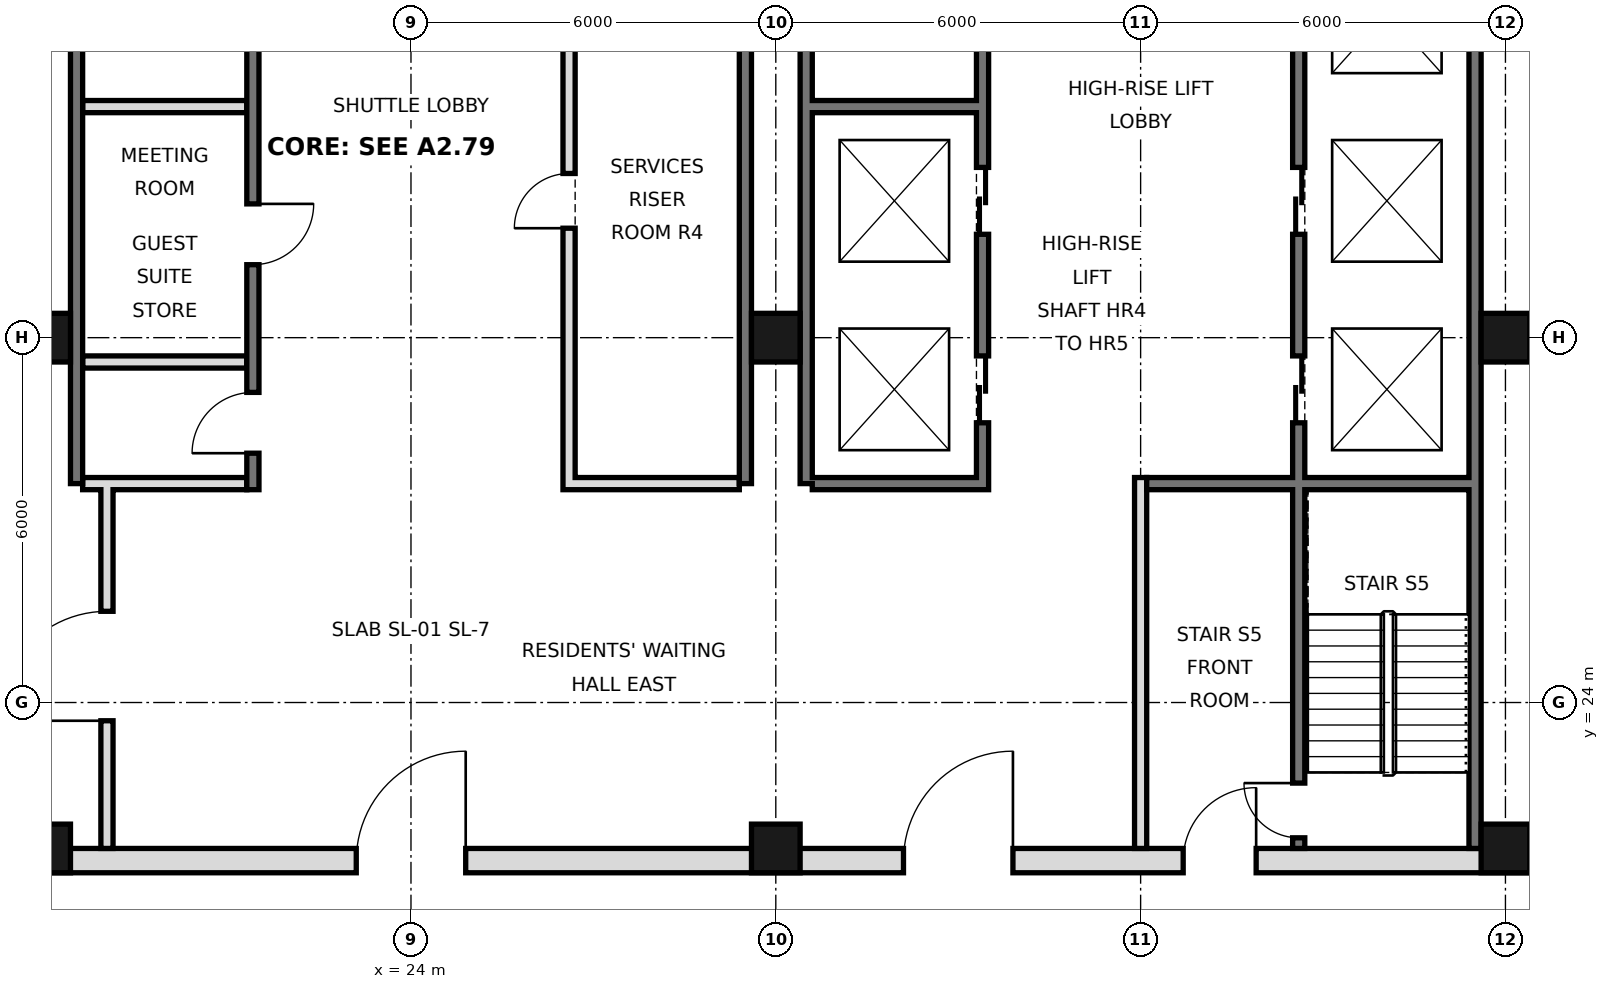
"""IFC4 building model, lengths in metres.
Left out: names, types, materials, properties, quantities, classifications, styles, units other than length and angle.
Written with IfcOpenShell. Run it as: python <this file> out.ifc"""

import sys

from ifc_helpers import new_model, si_unit, direction, frame, frame_2d, origin, origin_2d, place, context, subcontext, project, spatial, rectangle, hollow_rectangle, extrude, element, fill, save


model = new_model("IFC4")
c1 = context("Model", 3, precision=1e-05, world=origin(), true_north=direction((0.0, 1.0)))
c2 = subcontext(c1, "Body", "Model", "MODEL_VIEW")
j1 = project(units=[si_unit("LENGTHUNIT", "METRE"), si_unit("PLANEANGLEUNIT", "RADIAN")], contexts=[c1])
p1 = place(None, origin())
s1 = spatial("IfcSite", under=j1, at=p1, CompositionType="ELEMENT")
p2 = place(p1, origin())
s2 = spatial("IfcBuilding", under=s1, at=p2, CompositionType="ELEMENT")
p3 = place(p2, frame((0.0, 0.0, 316.0)))
s3 = spatial("IfcBuildingStorey", under=s2, at=p3, CompositionType="ELEMENT", Elevation=316.0)
for number, where, z_axis, x_axis in (
    (1, (18.0, 21.6, 0.0), (0.0, 0.0, 1.0), (1.0, 0.0, 0.0)),
    (2, (18.0, 30.0, 0.0), (0.0, 0.0, 1.0), (1.0, 0.0, 0.0)),
    (3, (30.0, 21.6, 0.0), (0.0, 0.0, 1.0), (1.0, 0.0, 0.0)),
    (4, (30.0, 30.0, 0.0), (0.0, 0.0, 1.0), (1.0, 0.0, 0.0)),
    (5, (42.0, 21.6, 0.0), (0.0, 0.0, 1.0), (1.0, 0.0, 0.0)),
    (6, (42.0, 30.0, 0.0), (0.0, 0.0, 1.0), (1.0, 0.0, 0.0)),
):
    element("IfcColumn", number, at=place(p3, frame(where, z_axis=z_axis, x_axis=x_axis)), inside=s3, PredefinedType="COLUMN", context=c2, shape_type="SweptSolid", body=[
        extrude(hollow_rectangle(XDim=0.8, YDim=0.8, WallThickness=0.025, at=origin_2d()), origin(), (0.0, 0.0, 1.0), 3.6),
    ])
p4 = place(p3, frame((41.5, 21.6, 0.0), z_axis=(0.0, 0.0, 1.0), x_axis=(0.0, 1.0, 0.0)))
e7 = element("IfcWall", 7, at=p4, inside=s3, PredefinedType="SOLIDWALL", context=c2, shape_type="SweptSolid", body=[
    extrude(rectangle(XDim=23.5, YDim=0.2, at=frame_2d((11.75, 0.0))), origin(), (0.0, 0.0, 1.0), 3.42),
])
for number, where, z_axis, x_axis in (
    (8, (18.5, 27.6, 0.0), (0.0, 0.0, 1.0), (0.0, 1.0, 0.0)),
    (9, (29.5, 27.6, 0.0), (0.0, 0.0, 1.0), (0.0, 1.0, 0.0)),
    (10, (30.5, 27.6, 0.0), (0.0, 0.0, 1.0), (0.0, 1.0, 0.0)),
):
    element("IfcWall", number, at=place(p3, frame(where, z_axis=z_axis, x_axis=x_axis)), inside=s3, PredefinedType="SOLIDWALL", context=c2, shape_type="SweptSolid", body=[
        extrude(rectangle(XDim=17.5, YDim=0.2, at=frame_2d((8.75, 0.0))), origin(), (0.0, 0.0, 1.0), 3.42),
    ])
p5 = place(p3, frame((5.6, 21.4, 0.0), z_axis=(0.0, 0.0, 1.0), x_axis=(1.0, 0.0, 0.0)))
e11 = element("IfcWall", 11, at=p5, inside=s3, PredefinedType="SOLIDWALL", context=c2, shape_type="SweptSolid", body=[
    extrude(rectangle(XDim=36.8, YDim=0.4, at=frame_2d((18.4, 0.0))), origin(), (0.0, 0.0, 1.0), 3.42),
])
p6 = place(p5, frame((8.5, 0.0, 0.0)))
e12 = element("IfcOpeningElement", 12, at=p6, cuts=e11, PredefinedType="OPENING", context=c2, shape_type="SweptSolid", body=[
    extrude(rectangle(XDim=1.8, YDim=2.1, at=frame_2d((0.9, 1.05))), frame((0.0, 0.21, 0.0), z_axis=(0.0, -1.0, 0.0), x_axis=(1.0, 0.0, 0.0)), (0.0, 0.0, 1.0), 0.42),
])
p7 = place(p5, frame((17.5, 0.0, 0.0)))
e13 = element("IfcOpeningElement", 13, at=p7, cuts=e11, PredefinedType="OPENING", context=c2, shape_type="SweptSolid", body=[
    extrude(rectangle(XDim=1.8, YDim=2.1, at=frame_2d((0.9, 1.05))), frame((0.0, 0.21, 0.0), z_axis=(0.0, -1.0, 0.0), x_axis=(1.0, 0.0, 0.0)), (0.0, 0.0, 1.0), 0.42),
])
p8 = place(p5, frame((26.5, 0.0, 0.0)))
e14 = element("IfcOpeningElement", 14, at=p8, cuts=e11, PredefinedType="OPENING", context=c2, shape_type="SweptSolid", body=[
    extrude(rectangle(XDim=1.8, YDim=2.1, at=frame_2d((0.9, 1.05))), frame((0.0, 0.21, 0.0), z_axis=(0.0, -1.0, 0.0), x_axis=(1.0, 0.0, 0.0)), (0.0, 0.0, 1.0), 0.42),
])
p9 = place(p5, frame((4.5, 0.0, 0.0)))
e15 = element("IfcOpeningElement", 15, at=p9, cuts=e11, PredefinedType="OPENING", context=c2, shape_type="SweptSolid", body=[
    extrude(rectangle(XDim=1.2, YDim=2.1, at=frame_2d((0.6, 1.05))), frame((0.0, 0.21, 0.0), z_axis=(0.0, -1.0, 0.0), x_axis=(1.0, 0.0, 0.0)), (0.0, 0.0, 1.0), 0.42),
])
p10 = place(p5, frame((31.1, 0.0, 0.0)))
e16 = element("IfcOpeningElement", 16, at=p10, cuts=e11, PredefinedType="OPENING", context=c2, shape_type="SweptSolid", body=[
    extrude(rectangle(XDim=1.2, YDim=2.1, at=frame_2d((0.6, 1.05))), frame((0.0, 0.21, 0.0), z_axis=(0.0, -1.0, 0.0), x_axis=(1.0, 0.0, 0.0)), (0.0, 0.0, 1.0), 0.42),
])
p11 = place(p3, frame((19.0, 21.6, 0.0), z_axis=(0.0, 0.0, 1.0), x_axis=(0.0, 1.0, 0.0)))
e17 = element("IfcWall", 17, at=p11, inside=s3, PredefinedType="PARTITIONING", context=c2, shape_type="SweptSolid", body=[
    extrude(rectangle(XDim=6.0, YDim=0.2, at=frame_2d((3.0, 0.0))), origin(), (0.0, 0.0, 1.0), 3.42),
])
p12 = place(p11, frame((2.1, 0.0, 0.0)))
e18 = element("IfcOpeningElement", 18, at=p12, cuts=e17, PredefinedType="OPENING", context=c2, shape_type="SweptSolid", body=[
    extrude(rectangle(XDim=1.8, YDim=2.1, at=frame_2d((0.9, 1.05))), frame((0.0, 0.11, 0.0), z_axis=(0.0, -1.0, 0.0), x_axis=(1.0, 0.0, 0.0)), (0.0, 0.0, 1.0), 0.22),
])
p13 = place(p3, frame((21.4, 27.5, 0.0), z_axis=(0.0, 0.0, 1.0), x_axis=(0.0, 1.0, 0.0)))
e19 = element("IfcWall", 19, at=p13, inside=s3, PredefinedType="SOLIDWALL", context=c2, shape_type="SweptSolid", body=[
    extrude(rectangle(XDim=17.5, YDim=0.2, at=frame_2d((8.75, 0.0))), origin(), (0.0, 0.0, 1.0), 3.42),
])
p14 = place(p13, frame((0.6, 0.0, 0.0)))
e20 = element("IfcOpeningElement", 20, at=p14, cuts=e19, PredefinedType="OPENING", context=c2, shape_type="SweptSolid", body=[
    extrude(rectangle(XDim=1.0, YDim=2.1, at=frame_2d((0.5, 1.05))), frame((0.0, 0.11, 0.0), z_axis=(0.0, -1.0, 0.0), x_axis=(1.0, 0.0, 0.0)), (0.0, 0.0, 1.0), 0.22),
])
p15 = place(p13, frame((3.7, 0.0, 0.0)))
e21 = element("IfcOpeningElement", 21, at=p15, cuts=e19, PredefinedType="OPENING", context=c2, shape_type="SweptSolid", body=[
    extrude(rectangle(XDim=1.0, YDim=2.1, at=frame_2d((0.5, 1.05))), frame((0.0, 0.11, 0.0), z_axis=(0.0, -1.0, 0.0), x_axis=(1.0, 0.0, 0.0)), (0.0, 0.0, 1.0), 0.22),
])
p16 = place(p13, frame((16.2, 0.0, 0.0)))
e22 = element("IfcOpeningElement", 22, at=p16, cuts=e19, PredefinedType="OPENING", context=c2, shape_type="SweptSolid", body=[
    extrude(rectangle(XDim=1.0, YDim=2.1, at=frame_2d((0.5, 1.05))), frame((0.0, 0.11, 0.0), z_axis=(0.0, -1.0, 0.0), x_axis=(1.0, 0.0, 0.0)), (0.0, 0.0, 1.0), 0.22),
])
p17 = place(p13, frame((7.4, 0.0, 0.0)))
e23 = element("IfcOpeningElement", 23, at=p17, cuts=e19, PredefinedType="OPENING", context=c2, shape_type="SweptSolid", body=[
    extrude(rectangle(XDim=0.9, YDim=2.1, at=frame_2d((0.45, 1.05))), frame((0.0, 0.11, 0.0), z_axis=(0.0, -1.0, 0.0), x_axis=(1.0, 0.0, 0.0)), (0.0, 0.0, 1.0), 0.22),
])
p18 = place(p3, frame((26.6, 27.5, 0.0), z_axis=(0.0, 0.0, 1.0), x_axis=(0.0, 1.0, 0.0)))
e24 = element("IfcWall", 24, at=p18, inside=s3, PredefinedType="SOLIDWALL", context=c2, shape_type="SweptSolid", body=[
    extrude(rectangle(XDim=17.5, YDim=0.2, at=frame_2d((8.75, 0.0))), origin(), (0.0, 0.0, 1.0), 3.42),
])
p19 = place(p18, frame((4.3, 0.0, 0.0)))
e25 = element("IfcOpeningElement", 25, at=p19, cuts=e24, PredefinedType="OPENING", context=c2, shape_type="SweptSolid", body=[
    extrude(rectangle(XDim=0.9, YDim=2.1, at=frame_2d((0.45, 1.05))), frame((0.0, 0.11, 0.0), z_axis=(0.0, -1.0, 0.0), x_axis=(1.0, 0.0, 0.0)), (0.0, 0.0, 1.0), 0.22),
])
p20 = place(p18, frame((10.35, 0.0, 0.0)))
e26 = element("IfcOpeningElement", 26, at=p20, cuts=e24, PredefinedType="OPENING", context=c2, shape_type="SweptSolid", body=[
    extrude(rectangle(XDim=1.0, YDim=2.1, at=frame_2d((0.5, 1.05))), frame((0.0, 0.11, 0.0), z_axis=(0.0, -1.0, 0.0), x_axis=(1.0, 0.0, 0.0)), (0.0, 0.0, 1.0), 0.22),
])
p21 = place(p3, frame((33.4, 27.5, 0.0), z_axis=(0.0, 0.0, 1.0), x_axis=(0.0, 1.0, 0.0)))
e27 = element("IfcWall", 27, at=p21, inside=s3, PredefinedType="SOLIDWALL", context=c2, shape_type="SweptSolid", body=[
    extrude(rectangle(XDim=17.5, YDim=0.2, at=frame_2d((8.75, 0.0))), origin(), (0.0, 0.0, 1.0), 3.42),
])
p22 = place(p21, frame((1.1, 0.0, 0.0)))
e28 = element("IfcOpeningElement", 28, at=p22, cuts=e27, PredefinedType="OPENING", context=c2, shape_type="SweptSolid", body=[
    extrude(rectangle(XDim=1.1, YDim=2.1, at=frame_2d((0.55, 1.05))), frame((0.0, 0.11, 0.0), z_axis=(0.0, -1.0, 0.0), x_axis=(1.0, 0.0, 0.0)), (0.0, 0.0, 1.0), 0.22),
])
p23 = place(p21, frame((4.2, 0.0, 0.0)))
e29 = element("IfcOpeningElement", 29, at=p23, cuts=e27, PredefinedType="OPENING", context=c2, shape_type="SweptSolid", body=[
    extrude(rectangle(XDim=1.1, YDim=2.1, at=frame_2d((0.55, 1.05))), frame((0.0, 0.11, 0.0), z_axis=(0.0, -1.0, 0.0), x_axis=(1.0, 0.0, 0.0)), (0.0, 0.0, 1.0), 0.22),
])
p24 = place(p21, frame((15.4, 0.0, 0.0)))
e30 = element("IfcOpeningElement", 30, at=p24, cuts=e27, PredefinedType="OPENING", context=c2, shape_type="SweptSolid", body=[
    extrude(rectangle(XDim=1.1, YDim=2.1, at=frame_2d((0.55, 1.05))), frame((0.0, 0.11, 0.0), z_axis=(0.0, -1.0, 0.0), x_axis=(1.0, 0.0, 0.0)), (0.0, 0.0, 1.0), 0.22),
])
p25 = place(p21, frame((9.9, 0.0, 0.0)))
e31 = element("IfcOpeningElement", 31, at=p25, cuts=e27, PredefinedType="OPENING", context=c2, shape_type="SweptSolid", body=[
    extrude(rectangle(XDim=0.9, YDim=2.1, at=frame_2d((0.45, 1.05))), frame((0.0, 0.11, 0.0), z_axis=(0.0, -1.0, 0.0), x_axis=(1.0, 0.0, 0.0)), (0.0, 0.0, 1.0), 0.22),
])
p26 = place(p3, frame((36.0, 21.6, 0.0), z_axis=(0.0, 0.0, 1.0), x_axis=(0.0, 1.0, 0.0)))
e32 = element("IfcWall", 32, at=p26, inside=s3, PredefinedType="PARTITIONING", context=c2, shape_type="SweptSolid", body=[
    extrude(rectangle(XDim=6.1, YDim=0.2, at=frame_2d((3.05, 0.0))), origin(), (0.0, 0.0, 1.0), 3.42),
])
p27 = place(p3, frame((38.6, 21.6, 0.0), z_axis=(0.0, 0.0, 1.0), x_axis=(0.0, 1.0, 0.0)))
e33 = element("IfcWall", 33, at=p27, inside=s3, PredefinedType="SOLIDWALL", context=c2, shape_type="SweptSolid", body=[
    extrude(rectangle(XDim=23.4, YDim=0.2, at=frame_2d((11.7, 0.0))), origin(), (0.0, 0.0, 1.0), 3.42),
])
p28 = place(p27, frame((7.0, 0.0, 0.0)))
e34 = element("IfcOpeningElement", 34, at=p28, cuts=e33, PredefinedType="OPENING", context=c2, shape_type="SweptSolid", body=[
    extrude(rectangle(XDim=1.1, YDim=2.1, at=frame_2d((0.55, 1.05))), frame((0.0, 0.11, 0.0), z_axis=(0.0, -1.0, 0.0), x_axis=(1.0, 0.0, 0.0)), (0.0, 0.0, 1.0), 0.22),
])
p29 = place(p27, frame((10.1, 0.0, 0.0)))
e35 = element("IfcOpeningElement", 35, at=p29, cuts=e33, PredefinedType="OPENING", context=c2, shape_type="SweptSolid", body=[
    extrude(rectangle(XDim=1.1, YDim=2.1, at=frame_2d((0.55, 1.05))), frame((0.0, 0.11, 0.0), z_axis=(0.0, -1.0, 0.0), x_axis=(1.0, 0.0, 0.0)), (0.0, 0.0, 1.0), 0.22),
])
p30 = place(p27, frame((13.2, 0.0, 0.0)))
e36 = element("IfcOpeningElement", 36, at=p30, cuts=e33, PredefinedType="OPENING", context=c2, shape_type="SweptSolid", body=[
    extrude(rectangle(XDim=1.1, YDim=2.1, at=frame_2d((0.55, 1.05))), frame((0.0, 0.11, 0.0), z_axis=(0.0, -1.0, 0.0), x_axis=(1.0, 0.0, 0.0)), (0.0, 0.0, 1.0), 0.22),
])
p31 = place(p27, frame((22.1, 0.0, 0.0)))
e37 = element("IfcOpeningElement", 37, at=p31, cuts=e33, PredefinedType="OPENING", context=c2, shape_type="SweptSolid", body=[
    extrude(rectangle(XDim=1.0, YDim=2.1, at=frame_2d((0.5, 1.05))), frame((0.0, 0.11, 0.0), z_axis=(0.0, -1.0, 0.0), x_axis=(1.0, 0.0, 0.0)), (0.0, 0.0, 1.0), 0.22),
])
p32 = place(p27, frame((0.175, 0.0, 0.0)))
e38 = element("IfcOpeningElement", 38, at=p32, cuts=e33, PredefinedType="OPENING", context=c2, shape_type="SweptSolid", body=[
    extrude(rectangle(XDim=0.9, YDim=2.1, at=frame_2d((0.45, 1.05))), frame((0.0, 0.11, 0.0), z_axis=(0.0, -1.0, 0.0), x_axis=(1.0, 0.0, 0.0)), (0.0, 0.0, 1.0), 0.22),
])
p33 = place(p3, frame((18.6, 27.6, 0.0), z_axis=(0.0, 0.0, 1.0), x_axis=(1.0, 0.0, 0.0)))
e39 = element("IfcWall", 39, at=p33, inside=s3, PredefinedType="PARTITIONING", context=c2, shape_type="SweptSolid", body=[
    extrude(rectangle(XDim=2.7, YDim=0.2, at=frame_2d((1.35, 0.0))), origin(), (0.0, 0.0, 1.0), 3.42),
])
for number, where, z_axis, x_axis in (
    (40, (26.7, 27.6, 0.0), (0.0, 0.0, 1.0), (1.0, 0.0, 0.0)),
    (41, (30.6, 27.6, 0.0), (0.0, 0.0, 1.0), (1.0, 0.0, 0.0)),
):
    element("IfcWall", number, at=place(p3, frame(where, z_axis=z_axis, x_axis=x_axis)), inside=s3, PredefinedType="SOLIDWALL", context=c2, shape_type="SweptSolid", body=[
        extrude(rectangle(XDim=2.7, YDim=0.2, at=frame_2d((1.35, 0.0))), origin(), (0.0, 0.0, 1.0), 3.42),
    ])
p34 = place(p3, frame((36.1, 27.6, 0.0), z_axis=(0.0, 0.0, 1.0), x_axis=(1.0, 0.0, 0.0)))
e42 = element("IfcWall", 42, at=p34, inside=s3, PredefinedType="SOLIDWALL", context=c2, shape_type="SweptSolid", body=[
    extrude(rectangle(XDim=5.3, YDim=0.2, at=frame_2d((2.65, 0.0))), origin(), (0.0, 0.0, 1.0), 3.42),
])
p35 = place(p3, frame((18.6, 29.6, 0.0), z_axis=(0.0, 0.0, 1.0), x_axis=(1.0, 0.0, 0.0)))
e43 = element("IfcWall", 43, at=p35, inside=s3, PredefinedType="PARTITIONING", context=c2, shape_type="SweptSolid", body=[
    extrude(rectangle(XDim=2.7, YDim=0.2, at=frame_2d((1.35, 0.0))), origin(), (0.0, 0.0, 1.0), 3.42),
])
for number, where, z_axis, x_axis in (
    (44, (18.6, 33.8, 0.0), (0.0, 0.0, 1.0), (1.0, 0.0, 0.0)),
    (45, (30.6, 33.8, 0.0), (0.0, 0.0, 1.0), (1.0, 0.0, 0.0)),
):
    element("IfcWall", number, at=place(p3, frame(where, z_axis=z_axis, x_axis=x_axis)), inside=s3, PredefinedType="SOLIDWALL", context=c2, shape_type="SweptSolid", body=[
        extrude(rectangle(XDim=2.7, YDim=0.2, at=frame_2d((1.35, 0.0))), origin(), (0.0, 0.0, 1.0), 3.42),
    ])
p36 = place(p12, origin())
e46 = element("IfcDoor", 46, at=p36, inside=s3, OperationType="SINGLE_SWING_LEFT", PredefinedType="DOOR", context=c2, shape_type="SweptSolid", body=[
    extrude(rectangle(XDim=1.8, YDim=2.1, at=frame_2d((0.9, 1.05))), frame((0.0, 0.025, 0.0), z_axis=(0.0, -1.0, 0.0), x_axis=(1.0, 0.0, 0.0)), (0.0, 0.0, 1.0), 0.05),
])
fill(e18, e46)
p37 = place(p7, frame((1.8, 0.0, 0.0), z_axis=(0.0, 0.0, 1.0), x_axis=(-1.0, 0.0, 0.0)))
e47 = element("IfcDoor", 47, at=p37, inside=s3, OperationType="SINGLE_SWING_LEFT", PredefinedType="DOOR", context=c2, shape_type="SweptSolid", body=[
    extrude(rectangle(XDim=1.8, YDim=2.1, at=frame_2d((0.9, 1.05))), frame((0.0, 0.025, 0.0), z_axis=(0.0, -1.0, 0.0), x_axis=(1.0, 0.0, 0.0)), (0.0, 0.0, 1.0), 0.05),
])
fill(e13, e47)
p38 = place(p8, frame((1.8, 0.0, 0.0), z_axis=(0.0, 0.0, 1.0), x_axis=(-1.0, 0.0, 0.0)))
e48 = element("IfcDoor", 48, at=p38, inside=s3, OperationType="SINGLE_SWING_LEFT", PredefinedType="DOOR", context=c2, shape_type="SweptSolid", body=[
    extrude(rectangle(XDim=1.8, YDim=2.1, at=frame_2d((0.9, 1.05))), frame((0.0, 0.025, 0.0), z_axis=(0.0, -1.0, 0.0), x_axis=(1.0, 0.0, 0.0)), (0.0, 0.0, 1.0), 0.05),
])
fill(e14, e48)
p39 = place(p10, frame((1.2, 0.0, 0.0), z_axis=(0.0, 0.0, 1.0), x_axis=(-1.0, 0.0, 0.0)))
e49 = element("IfcDoor", 49, at=p39, inside=s3, OperationType="SINGLE_SWING_LEFT", PredefinedType="DOOR", context=c2, shape_type="SweptSolid", body=[
    extrude(rectangle(XDim=1.2, YDim=2.1, at=frame_2d((0.6, 1.05))), frame((0.0, 0.025, 0.0), z_axis=(0.0, -1.0, 0.0), x_axis=(1.0, 0.0, 0.0)), (0.0, 0.0, 1.0), 0.05),
])
fill(e16, e49)
p40 = place(p28, origin())
e50 = element("IfcDoor", 50, at=p40, inside=s3, OperationType="DOUBLE_DOOR_SLIDING", PredefinedType="DOOR", context=c2, shape_type="SweptSolid", body=[
    extrude(rectangle(XDim=1.1, YDim=2.1, at=frame_2d((0.55, 1.05))), frame((0.0, 0.025, 0.0), z_axis=(0.0, -1.0, 0.0), x_axis=(1.0, 0.0, 0.0)), (0.0, 0.0, 1.0), 0.05),
])
fill(e34, e50)
p41 = place(p29, origin())
e51 = element("IfcDoor", 51, at=p41, inside=s3, OperationType="DOUBLE_DOOR_SLIDING", PredefinedType="DOOR", context=c2, shape_type="SweptSolid", body=[
    extrude(rectangle(XDim=1.1, YDim=2.1, at=frame_2d((0.55, 1.05))), frame((0.0, 0.025, 0.0), z_axis=(0.0, -1.0, 0.0), x_axis=(1.0, 0.0, 0.0)), (0.0, 0.0, 1.0), 0.05),
])
fill(e35, e51)
p42 = place(p22, origin())
e52 = element("IfcDoor", 52, at=p42, inside=s3, OperationType="DOUBLE_DOOR_SLIDING", PredefinedType="DOOR", context=c2, shape_type="SweptSolid", body=[
    extrude(rectangle(XDim=1.1, YDim=2.1, at=frame_2d((0.55, 1.05))), frame((0.0, 0.025, 0.0), z_axis=(0.0, -1.0, 0.0), x_axis=(1.0, 0.0, 0.0)), (0.0, 0.0, 1.0), 0.05),
])
fill(e28, e52)
p43 = place(p23, origin())
e53 = element("IfcDoor", 53, at=p43, inside=s3, OperationType="DOUBLE_DOOR_SLIDING", PredefinedType="DOOR", context=c2, shape_type="SweptSolid", body=[
    extrude(rectangle(XDim=1.1, YDim=2.1, at=frame_2d((0.55, 1.05))), frame((0.0, 0.025, 0.0), z_axis=(0.0, -1.0, 0.0), x_axis=(1.0, 0.0, 0.0)), (0.0, 0.0, 1.0), 0.05),
])
fill(e29, e53)
p44 = place(p14, origin())
e54 = element("IfcDoor", 54, at=p44, inside=s3, OperationType="SINGLE_SWING_LEFT", PredefinedType="DOOR", context=c2, shape_type="SweptSolid", body=[
    extrude(rectangle(XDim=1.0, YDim=2.1, at=frame_2d((0.5, 1.05))), frame((0.0, 0.025, 0.0), z_axis=(0.0, -1.0, 0.0), x_axis=(1.0, 0.0, 0.0)), (0.0, 0.0, 1.0), 0.05),
])
fill(e20, e54)
p45 = place(p15, origin())
e55 = element("IfcDoor", 55, at=p45, inside=s3, OperationType="SINGLE_SWING_RIGHT", PredefinedType="DOOR", context=c2, shape_type="SweptSolid", body=[
    extrude(rectangle(XDim=1.0, YDim=2.1, at=frame_2d((0.5, 1.05))), frame((0.0, 0.025, 0.0), z_axis=(0.0, -1.0, 0.0), x_axis=(1.0, 0.0, 0.0)), (0.0, 0.0, 1.0), 0.05),
])
fill(e21, e55)
p46 = place(p32, frame((0.9, 0.0, 0.0), z_axis=(0.0, 0.0, 1.0), x_axis=(-1.0, 0.0, 0.0)))
e56 = element("IfcDoor", 56, at=p46, inside=s3, OperationType="SINGLE_SWING_LEFT", PredefinedType="DOOR", context=c2, shape_type="SweptSolid", body=[
    extrude(rectangle(XDim=0.9, YDim=2.1, at=frame_2d((0.45, 1.05))), frame((0.0, 0.025, 0.0), z_axis=(0.0, -1.0, 0.0), x_axis=(1.0, 0.0, 0.0)), (0.0, 0.0, 1.0), 0.05),
])
fill(e38, e56)
p47 = place(p19, origin())
e57 = element("IfcDoor", 57, at=p47, inside=s3, OperationType="SINGLE_SWING_LEFT", PredefinedType="DOOR", context=c2, shape_type="SweptSolid", body=[
    extrude(rectangle(XDim=0.9, YDim=2.1, at=frame_2d((0.45, 1.05))), frame((0.0, 0.025, 0.0), z_axis=(0.0, -1.0, 0.0), x_axis=(1.0, 0.0, 0.0)), (0.0, 0.0, 1.0), 0.05),
])
fill(e25, e57)
save(model, sys.argv[1])
